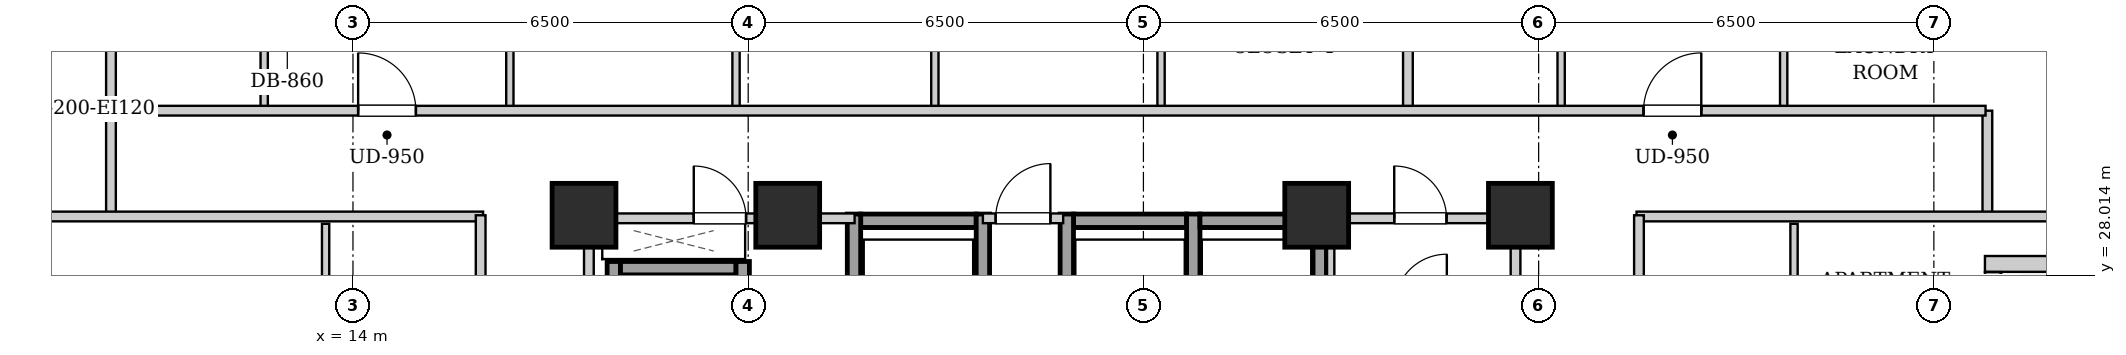
"""IFC4 building model, lengths in metres.
Left out: names, types, materials, properties, quantities, classifications, styles, units other than length and angle.
Written with IfcOpenShell. Run it as: python <this file> out.ifc"""

import sys

from ifc_helpers import new_model, si_unit, direction, frame, frame_2d, origin, origin_2d, place, context, subcontext, project, spatial, rectangle, extrude, element, fill, save


model = new_model("IFC4")
c1 = context("Model", 3, precision=1e-05, world=origin(), true_north=direction((0.0, 1.0)))
c2 = subcontext(c1, "Body", "Model", "MODEL_VIEW")
j1 = project(units=[si_unit("LENGTHUNIT", "METRE"), si_unit("PLANEANGLEUNIT", "RADIAN")], contexts=[c1])
p1 = place(None, origin())
s1 = spatial("IfcSite", under=j1, at=p1, CompositionType="ELEMENT")
p2 = place(p1, origin())
s2 = spatial("IfcBuilding", under=s1, at=p2, CompositionType="ELEMENT")
p3 = place(p2, frame((0.0, 0.0, 81.5)))
s3 = spatial("IfcBuildingStorey", under=s2, at=p3, CompositionType="ELEMENT", Elevation=81.5)
for number, where, z_axis, x_axis in (
    (1, (17.8, 29.0, 0.0), (0.0, 0.0, 1.0), (1.0, 0.0, 0.0)),
    (2, (21.15, 29.0, 0.0), (0.0, 0.0, 1.0), (1.0, 0.0, 0.0)),
    (3, (29.85, 29.0, 0.0), (0.0, 0.0, 1.0), (1.0, 0.0, 0.0)),
    (4, (33.2, 29.0, 0.0), (0.0, 0.0, 1.0), (1.0, 0.0, 0.0)),
):
    element("IfcColumn", number, at=place(p3, frame(where, z_axis=z_axis, x_axis=x_axis)), inside=s3, PredefinedType="COLUMN", context=c2, shape_type="SweptSolid", body=[
        extrude(rectangle(XDim=1.05, YDim=1.05, at=origin_2d()), origin(), (0.0, 0.0, 1.0), 3.2),
    ])
p4 = place(p3, frame((43.24, 28.2, 0.0), z_axis=(0.0, 0.0, 1.0), x_axis=(-1.0, 0.0, 0.0)))
e5 = element("IfcWall", 5, at=p4, inside=s3, PredefinedType="SOLIDWALL", context=c2, shape_type="SweptSolid", body=[
    extrude(rectangle(XDim=2.4, YDim=0.26, at=frame_2d((1.2, 0.0))), origin(), (0.0, 0.0, 1.0), 2.94),
])
p5 = place(p3, frame((40.97, 28.066, 0.0), z_axis=(0.0, 0.0, 1.0), x_axis=(0.0, -1.0, 0.0)))
e6 = element("IfcWall", 6, at=p5, inside=s3, PredefinedType="SOLIDWALL", context=c2, shape_type="SweptSolid", body=[
    extrude(rectangle(XDim=3.332, YDim=0.26, at=frame_2d((1.666, 0.0))), origin(), (0.0, 0.0, 1.0), 2.94),
])
p6 = place(p5, frame((1.116, 0.0, 0.0)))
e7 = element("IfcOpeningElement", 7, at=p6, cuts=e6, PredefinedType="OPENING", context=c2, shape_type="SweptSolid", body=[
    extrude(rectangle(XDim=1.1, YDim=2.0, at=frame_2d((0.55, 1.0))), frame((0.0, 0.14, 0.0), z_axis=(0.0, -1.0, 0.0), x_axis=(1.0, 0.0, 0.0)), (0.0, 0.0, 1.0), 0.28),
])
p7 = place(p5, frame((0.276, 0.0, 0.55)))
e8 = element("IfcOpeningElement", 8, at=p7, cuts=e6, PredefinedType="OPENING", context=c2, shape_type="SweptSolid", body=[
    extrude(rectangle(XDim=0.68, YDim=1.2, at=frame_2d((0.34, 0.6))), frame((0.0, 0.14, 0.0), z_axis=(0.0, -1.0, 0.0), x_axis=(1.0, 0.0, 0.0)), (0.0, 0.0, 1.0), 0.28),
])
p8 = place(p3, frame((22.35, 28.91, 0.0), z_axis=(0.0, 0.0, 1.0), x_axis=(1.0, 0.0, 0.0)))
e9 = element("IfcWall", 9, at=p8, inside=s3, PredefinedType="SHEAR", context=c2, shape_type="SweptSolid", body=[
    extrude(rectangle(XDim=1.9, YDim=0.22, at=frame_2d((0.95, 0.0))), origin(), (0.0, 0.0, 1.0), 2.94),
])
for number, where, z_axis, x_axis in (
    (10, (22.24, 26.58, 0.0), (0.0, 0.0, 1.0), (0.0, 1.0, 0.0)),
    (11, (24.36, 26.58, 0.0), (0.0, 0.0, 1.0), (0.0, 1.0, 0.0)),
):
    element("IfcWall", number, at=place(p3, frame(where, z_axis=z_axis, x_axis=x_axis)), inside=s3, PredefinedType="SHEAR", context=c2, shape_type="SweptSolid", body=[
        extrude(rectangle(XDim=2.44, YDim=0.22, at=frame_2d((1.22, 0.0))), origin(), (0.0, 0.0, 1.0), 2.94),
    ])
p9 = place(p3, frame((25.85, 28.91, 0.0), z_axis=(0.0, 0.0, 1.0), x_axis=(1.0, 0.0, 0.0)))
e12 = element("IfcWall", 12, at=p9, inside=s3, PredefinedType="SHEAR", context=c2, shape_type="SweptSolid", body=[
    extrude(rectangle(XDim=1.86, YDim=0.22, at=frame_2d((0.93, 0.0))), origin(), (0.0, 0.0, 1.0), 2.94),
])
for number, where, z_axis, x_axis in (
    (13, (25.74, 26.58, 0.0), (0.0, 0.0, 1.0), (0.0, 1.0, 0.0)),
    (14, (27.82, 26.58, 0.0), (0.0, 0.0, 1.0), (0.0, 1.0, 0.0)),
):
    element("IfcWall", number, at=place(p3, frame(where, z_axis=z_axis, x_axis=x_axis)), inside=s3, PredefinedType="SHEAR", context=c2, shape_type="SweptSolid", body=[
        extrude(rectangle(XDim=2.44, YDim=0.22, at=frame_2d((1.22, 0.0))), origin(), (0.0, 0.0, 1.0), 2.94),
    ])
p10 = place(p3, frame((27.93, 28.91, 0.0), z_axis=(0.0, 0.0, 1.0), x_axis=(1.0, 0.0, 0.0)))
e15 = element("IfcWall", 15, at=p10, inside=s3, PredefinedType="SHEAR", context=c2, shape_type="SweptSolid", body=[
    extrude(rectangle(XDim=1.86, YDim=0.22, at=frame_2d((0.93, 0.0))), origin(), (0.0, 0.0, 1.0), 2.94),
])
p11 = place(p3, frame((29.9, 26.58, 0.0), z_axis=(0.0, 0.0, 1.0), x_axis=(0.0, 1.0, 0.0)))
e16 = element("IfcWall", 16, at=p11, inside=s3, PredefinedType="SHEAR", context=c2, shape_type="SweptSolid", body=[
    extrude(rectangle(XDim=2.44, YDim=0.22, at=frame_2d((1.22, 0.0))), origin(), (0.0, 0.0, 1.0), 2.94),
])
p12 = place(p3, frame((18.29, 24.1, 0.0), z_axis=(0.0, 0.0, 1.0), x_axis=(0.0, 1.0, 0.0)))
e17 = element("IfcWall", 17, at=p12, inside=s3, PredefinedType="SHEAR", context=c2, shape_type="SweptSolid", body=[
    extrude(rectangle(XDim=4.14, YDim=0.22, at=frame_2d((2.07, 0.0))), origin(), (0.0, 0.0, 1.0), 2.94),
])
p13 = place(p3, frame((18.4, 28.13, 0.0), z_axis=(0.0, 0.0, 1.0), x_axis=(1.0, 0.0, 0.0)))
e18 = element("IfcWall", 18, at=p13, inside=s3, PredefinedType="SHEAR", context=c2, shape_type="SweptSolid", body=[
    extrude(rectangle(XDim=1.9, YDim=0.22, at=frame_2d((0.95, 0.0))), origin(), (0.0, 0.0, 1.0), 2.94),
])
p14 = place(p3, frame((20.41, 26.06, 0.0), z_axis=(0.0, 0.0, 1.0), x_axis=(0.0, 1.0, 0.0)))
e19 = element("IfcWall", 19, at=p14, inside=s3, PredefinedType="SHEAR", context=c2, shape_type="SweptSolid", body=[
    extrude(rectangle(XDim=2.18, YDim=0.22, at=frame_2d((1.09, 0.0))), origin(), (0.0, 0.0, 1.0), 2.94),
])
for number, where, z_axis, x_axis in (
    (20, (17.88, 24.12, 0.0), (0.0, 0.0, 1.0), (0.0, 1.0, 0.0)),
    (21, (33.12, 24.12, 0.0), (0.0, 0.0, 1.0), (0.0, 1.0, 0.0)),
):
    element("IfcWall", number, at=place(p3, frame(where, z_axis=z_axis, x_axis=x_axis)), inside=s3, PredefinedType="PARTITIONING", context=c2, shape_type="SweptSolid", body=[
        extrude(rectangle(XDim=4.76, YDim=0.16, at=frame_2d((2.38, 0.0))), origin(), (0.0, 0.0, 1.0), 2.94),
    ])
p15 = place(p3, frame((24.36, 28.95, 0.0), z_axis=(0.0, 0.0, 1.0), x_axis=(1.0, 0.0, 0.0)))
e22 = element("IfcWall", 22, at=p15, inside=s3, PredefinedType="PARTITIONING", context=c2, shape_type="SweptSolid", body=[
    extrude(rectangle(XDim=1.32, YDim=0.16, at=frame_2d((0.66, 0.0))), origin(), (0.0, 0.0, 1.0), 2.309),
])
p16 = place(p15, frame((0.21, 0.0, 0.0)))
e23 = element("IfcOpeningElement", 23, at=p16, cuts=e22, PredefinedType="OPENING", context=c2, shape_type="SweptSolid", body=[
    extrude(rectangle(XDim=0.9, YDim=2.05, at=frame_2d((0.45, 1.025))), frame((0.0, 0.09, 0.0), z_axis=(0.0, -1.0, 0.0), x_axis=(1.0, 0.0, 0.0)), (0.0, 0.0, 1.0), 0.18),
])
p17 = place(p3, frame((17.96, 28.95, 0.0), z_axis=(0.0, 0.0, 1.0), x_axis=(1.0, 0.0, 0.0)))
e24 = element("IfcWall", 24, at=p17, inside=s3, PredefinedType="PARTITIONING", context=c2, shape_type="SweptSolid", body=[
    extrude(rectangle(XDim=4.29, YDim=0.16, at=frame_2d((2.145, 0.0))), origin(), (0.0, 0.0, 1.0), 2.309),
])
p18 = place(p17, frame((1.645, 0.0, 0.0)))
e25 = element("IfcOpeningElement", 25, at=p18, cuts=e24, PredefinedType="OPENING", context=c2, shape_type="SweptSolid", body=[
    extrude(rectangle(XDim=0.86, YDim=2.05, at=frame_2d((0.43, 1.025))), frame((0.0, 0.09, 0.0), z_axis=(0.0, -1.0, 0.0), x_axis=(1.0, 0.0, 0.0)), (0.0, 0.0, 1.0), 0.18),
])
p19 = place(p3, frame((30.08, 26.18, 0.0), z_axis=(0.0, 0.0, 1.0), x_axis=(0.0, 1.0, 0.0)))
e26 = element("IfcWall", 26, at=p19, inside=s3, PredefinedType="PARTITIONING", context=c2, shape_type="SweptSolid", body=[
    extrude(rectangle(XDim=2.68, YDim=0.12, at=frame_2d((1.34, 0.0))), origin(), (0.0, 0.0, 1.0), 2.94),
])
p20 = place(p3, frame((30.08, 28.95, 0.0), z_axis=(0.0, 0.0, 1.0), x_axis=(1.0, 0.0, 0.0)))
e27 = element("IfcWall", 27, at=p20, inside=s3, PredefinedType="PARTITIONING", context=c2, shape_type="SweptSolid", body=[
    extrude(rectangle(XDim=2.96, YDim=0.16, at=frame_2d((1.48, 0.0))), origin(), (0.0, 0.0, 1.0), 2.94),
])
p21 = place(p20, frame((1.045, 0.0, 0.0)))
e28 = element("IfcOpeningElement", 28, at=p21, cuts=e27, PredefinedType="OPENING", context=c2, shape_type="SweptSolid", body=[
    extrude(rectangle(XDim=0.86, YDim=2.05, at=frame_2d((0.43, 1.025))), frame((0.0, 0.09, 0.0), z_axis=(0.0, -1.0, 0.0), x_axis=(1.0, 0.0, 0.0)), (0.0, 0.0, 1.0), 0.18),
])
for number, where, z_axis, x_axis in (
    (29, (10.02, 28.98, 0.0), (0.0, 0.0, 1.0), (0.0, 1.0, 0.0)),
    (30, (40.88, 28.98, 0.0), (0.0, 0.0, 1.0), (0.0, 1.0, 0.0)),
):
    element("IfcWall", number, at=place(p3, frame(where, z_axis=z_axis, x_axis=x_axis)), inside=s3, PredefinedType="PARTITIONING", context=c2, shape_type="SweptSolid", body=[
        extrude(rectangle(XDim=1.74, YDim=0.16, at=frame_2d((0.87, 0.0))), origin(), (0.0, 0.0, 1.0), 2.94),
    ])
p22 = place(p3, frame((7.78, 28.98, 0.0), z_axis=(0.0, 0.0, 1.0), x_axis=(1.0, 0.0, 0.0)))
e31 = element("IfcWall", 31, at=p22, inside=s3, PredefinedType="PARTITIONING", context=c2, shape_type="SweptSolid", body=[
    extrude(rectangle(XDim=8.36, YDim=0.16, at=frame_2d((4.18, 0.0))), origin(), (0.0, 0.0, 1.0), 2.309),
])
p23 = place(p3, frame((35.11, 28.98, 0.0), z_axis=(0.0, 0.0, 1.0), x_axis=(1.0, 0.0, 0.0)))
e32 = element("IfcWall", 32, at=p23, inside=s3, PredefinedType="PARTITIONING", context=c2, shape_type="SweptSolid", body=[
    extrude(rectangle(XDim=8.01, YDim=0.16, at=frame_2d((4.005, 0.0))), origin(), (0.0, 0.0, 1.0), 2.309),
])
p24 = place(p3, frame((10.02, 30.76, 0.0), z_axis=(0.0, 0.0, 1.0), x_axis=(0.0, 1.0, 0.0)))
e33 = element("IfcWall", 33, at=p24, inside=s3, PredefinedType="PARTITIONING", context=c2, shape_type="SweptSolid", body=[
    extrude(rectangle(XDim=2.91, YDim=0.16, at=frame_2d((1.455, 0.0))), origin(), (0.0, 0.0, 1.0), 2.94),
])
p25 = place(p3, frame((12.54, 30.76, 0.0), z_axis=(0.0, 0.0, 1.0), x_axis=(0.0, 1.0, 0.0)))
e34 = element("IfcWall", 34, at=p25, inside=s3, PredefinedType="PARTITIONING", context=c2, shape_type="SweptSolid", body=[
    extrude(rectangle(XDim=2.85, YDim=0.12, at=frame_2d((1.425, 0.0))), origin(), (0.0, 0.0, 1.0), 2.94),
])
p26 = place(p25, frame((0.995, 0.0, 0.0)))
e35 = element("IfcOpeningElement", 35, at=p26, cuts=e34, PredefinedType="OPENING", context=c2, shape_type="SweptSolid", body=[
    extrude(rectangle(XDim=0.86, YDim=2.05, at=frame_2d((0.43, 1.025))), frame((0.0, 0.07, 0.0), z_axis=(0.0, -1.0, 0.0), x_axis=(1.0, 0.0, 0.0)), (0.0, 0.0, 1.0), 0.14),
])
p27 = place(p3, frame((16.58, 30.76, 0.0), z_axis=(0.0, 0.0, 1.0), x_axis=(0.0, 1.0, 0.0)))
e36 = element("IfcWall", 36, at=p27, inside=s3, PredefinedType="PARTITIONING", context=c2, shape_type="SweptSolid", body=[
    extrude(rectangle(XDim=2.85, YDim=0.12, at=frame_2d((1.425, 0.0))), origin(), (0.0, 0.0, 1.0), 2.94),
])
p28 = place(p27, frame((0.975, 0.0, 0.0)))
e37 = element("IfcOpeningElement", 37, at=p28, cuts=e36, PredefinedType="OPENING", context=c2, shape_type="SweptSolid", body=[
    extrude(rectangle(XDim=0.9, YDim=2.05, at=frame_2d((0.45, 1.025))), frame((0.0, 0.07, 0.0), z_axis=(0.0, -1.0, 0.0), x_axis=(1.0, 0.0, 0.0)), (0.0, 0.0, 1.0), 0.14),
])
p29 = place(p3, frame((20.3, 30.76, 0.0), z_axis=(0.0, 0.0, 1.0), x_axis=(0.0, 1.0, 0.0)))
e38 = element("IfcWall", 38, at=p29, inside=s3, PredefinedType="PARTITIONING", context=c2, shape_type="SweptSolid", body=[
    extrude(rectangle(XDim=2.85, YDim=0.12, at=frame_2d((1.425, 0.0))), origin(), (0.0, 0.0, 1.0), 2.94),
])
p30 = place(p29, frame((0.975, 0.0, 0.0)))
e39 = element("IfcOpeningElement", 39, at=p30, cuts=e38, PredefinedType="OPENING", context=c2, shape_type="SweptSolid", body=[
    extrude(rectangle(XDim=0.9, YDim=2.05, at=frame_2d((0.45, 1.025))), frame((0.0, 0.07, 0.0), z_axis=(0.0, -1.0, 0.0), x_axis=(1.0, 0.0, 0.0)), (0.0, 0.0, 1.0), 0.14),
])
p31 = place(p3, frame((23.57, 30.76, 0.0), z_axis=(0.0, 0.0, 1.0), x_axis=(0.0, 1.0, 0.0)))
e40 = element("IfcWall", 40, at=p31, inside=s3, PredefinedType="PARTITIONING", context=c2, shape_type="SweptSolid", body=[
    extrude(rectangle(XDim=2.85, YDim=0.12, at=frame_2d((1.425, 0.0))), origin(), (0.0, 0.0, 1.0), 2.94),
])
p32 = place(p31, frame((0.975, 0.0, 0.0)))
e41 = element("IfcOpeningElement", 41, at=p32, cuts=e40, PredefinedType="OPENING", context=c2, shape_type="SweptSolid", body=[
    extrude(rectangle(XDim=0.9, YDim=2.05, at=frame_2d((0.45, 1.025))), frame((0.0, 0.07, 0.0), z_axis=(0.0, -1.0, 0.0), x_axis=(1.0, 0.0, 0.0)), (0.0, 0.0, 1.0), 0.14),
])
p33 = place(p3, frame((27.29, 30.76, 0.0), z_axis=(0.0, 0.0, 1.0), x_axis=(0.0, 1.0, 0.0)))
e42 = element("IfcWall", 42, at=p33, inside=s3, PredefinedType="PARTITIONING", context=c2, shape_type="SweptSolid", body=[
    extrude(rectangle(XDim=2.85, YDim=0.12, at=frame_2d((1.425, 0.0))), origin(), (0.0, 0.0, 1.0), 2.94),
])
p34 = place(p33, frame((0.975, 0.0, 0.0)))
e43 = element("IfcOpeningElement", 43, at=p34, cuts=e42, PredefinedType="OPENING", context=c2, shape_type="SweptSolid", body=[
    extrude(rectangle(XDim=0.9, YDim=2.05, at=frame_2d((0.45, 1.025))), frame((0.0, 0.07, 0.0), z_axis=(0.0, -1.0, 0.0), x_axis=(1.0, 0.0, 0.0)), (0.0, 0.0, 1.0), 0.14),
])
p35 = place(p3, frame((31.35, 30.76, 0.0), z_axis=(0.0, 0.0, 1.0), x_axis=(0.0, 1.0, 0.0)))
e44 = element("IfcWall", 44, at=p35, inside=s3, PredefinedType="PARTITIONING", context=c2, shape_type="SweptSolid", body=[
    extrude(rectangle(XDim=12.26, YDim=0.16, at=frame_2d((6.13, 0.0))), origin(), (0.0, 0.0, 1.0), 2.94),
])
p36 = place(p3, frame((33.87, 30.76, 0.0), z_axis=(0.0, 0.0, 1.0), x_axis=(0.0, 1.0, 0.0)))
e45 = element("IfcWall", 45, at=p36, inside=s3, PredefinedType="PARTITIONING", context=c2, shape_type="SweptSolid", body=[
    extrude(rectangle(XDim=2.85, YDim=0.12, at=frame_2d((1.425, 0.0))), origin(), (0.0, 0.0, 1.0), 2.94),
])
p37 = place(p36, frame((0.995, 0.0, 0.0)))
e46 = element("IfcOpeningElement", 46, at=p37, cuts=e45, PredefinedType="OPENING", context=c2, shape_type="SweptSolid", body=[
    extrude(rectangle(XDim=0.86, YDim=2.05, at=frame_2d((0.43, 1.025))), frame((0.0, 0.07, 0.0), z_axis=(0.0, -1.0, 0.0), x_axis=(1.0, 0.0, 0.0)), (0.0, 0.0, 1.0), 0.14),
])
p38 = place(p3, frame((37.53, 30.76, 0.0), z_axis=(0.0, 0.0, 1.0), x_axis=(0.0, 1.0, 0.0)))
e47 = element("IfcWall", 47, at=p38, inside=s3, PredefinedType="PARTITIONING", context=c2, shape_type="SweptSolid", body=[
    extrude(rectangle(XDim=2.85, YDim=0.12, at=frame_2d((1.425, 0.0))), origin(), (0.0, 0.0, 1.0), 2.94),
])
p39 = place(p38, frame((0.975, 0.0, 0.0)))
e48 = element("IfcOpeningElement", 48, at=p39, cuts=e47, PredefinedType="OPENING", context=c2, shape_type="SweptSolid", body=[
    extrude(rectangle(XDim=0.9, YDim=2.05, at=frame_2d((0.45, 1.025))), frame((0.0, 0.07, 0.0), z_axis=(0.0, -1.0, 0.0), x_axis=(1.0, 0.0, 0.0)), (0.0, 0.0, 1.0), 0.14),
])
p40 = place(p3, frame((13.55, 24.552, 0.0), z_axis=(0.0, 0.0, 1.0), x_axis=(0.0, 1.0, 0.0)))
e49 = element("IfcWall", 49, at=p40, inside=s3, PredefinedType="PARTITIONING", context=c2, shape_type="SweptSolid", body=[
    extrude(rectangle(XDim=4.308, YDim=0.12, at=frame_2d((2.154, 0.0))), origin(), (0.0, 0.0, 1.0), 2.94),
])
p41 = place(p40, frame((1.704, 0.0, 0.0)))
e50 = element("IfcOpeningElement", 50, at=p41, cuts=e49, PredefinedType="OPENING", context=c2, shape_type="SweptSolid", body=[
    extrude(rectangle(XDim=0.9, YDim=2.05, at=frame_2d((0.45, 1.025))), frame((0.0, 0.07, 0.0), z_axis=(0.0, -1.0, 0.0), x_axis=(1.0, 0.0, 0.0)), (0.0, 0.0, 1.0), 0.14),
])
p42 = place(p3, frame((37.7, 24.552, 0.0), z_axis=(0.0, 0.0, 1.0), x_axis=(0.0, 1.0, 0.0)))
e51 = element("IfcWall", 51, at=p42, inside=s3, PredefinedType="PARTITIONING", context=c2, shape_type="SweptSolid", body=[
    extrude(rectangle(XDim=4.308, YDim=0.12, at=frame_2d((2.154, 0.0))), origin(), (0.0, 0.0, 1.0), 2.94),
])
p43 = place(p42, frame((1.704, 0.0, 0.0)))
e52 = element("IfcOpeningElement", 52, at=p43, cuts=e51, PredefinedType="OPENING", context=c2, shape_type="SweptSolid", body=[
    extrude(rectangle(XDim=0.9, YDim=2.05, at=frame_2d((0.45, 1.025))), frame((0.0, 0.07, 0.0), z_axis=(0.0, -1.0, 0.0), x_axis=(1.0, 0.0, 0.0)), (0.0, 0.0, 1.0), 0.14),
])
p44 = place(p3, frame((10.05, 30.72, 0.0), z_axis=(0.0, 0.0, 1.0), x_axis=(1.0, 0.0, 0.0)))
e53 = element("IfcWall", 53, at=p44, inside=s3, PredefinedType="PARTITIONING", context=c2, shape_type="SweptSolid", body=[
    extrude(rectangle(XDim=30.8, YDim=0.16, at=frame_2d((15.4, 0.0))), origin(), (0.0, 0.0, 1.0), 2.94),
])
p45 = place(p44, frame((4.035, 0.0, 0.0)))
e54 = element("IfcOpeningElement", 54, at=p45, cuts=e53, PredefinedType="OPENING", context=c2, shape_type="SweptSolid", body=[
    extrude(rectangle(XDim=0.95, YDim=2.1, at=frame_2d((0.475, 1.05))), frame((0.0, 0.09, 0.0), z_axis=(0.0, -1.0, 0.0), x_axis=(1.0, 0.0, 0.0)), (0.0, 0.0, 1.0), 0.18),
])
p46 = place(p44, frame((25.175, 0.0, 0.0)))
e55 = element("IfcOpeningElement", 55, at=p46, cuts=e53, PredefinedType="OPENING", context=c2, shape_type="SweptSolid", body=[
    extrude(rectangle(XDim=0.95, YDim=2.1, at=frame_2d((0.475, 1.05))), frame((0.0, 0.09, 0.0), z_axis=(0.0, -1.0, 0.0), x_axis=(1.0, 0.0, 0.0)), (0.0, 0.0, 1.0), 0.18),
])
p47 = place(p3, frame((16.1, 15.07, 0.0), z_axis=(0.0, 0.0, 1.0), x_axis=(0.0, 1.0, 0.0)))
e56 = element("IfcWall", 56, at=p47, inside=s3, PredefinedType="PARTITIONING", context=c2, shape_type="SweptSolid", body=[
    extrude(rectangle(XDim=13.93, YDim=0.16, at=frame_2d((6.965, 0.0))), origin(), (0.0, 0.0, 1.0), 2.94),
])
p48 = place(p47, frame((4.385, 0.0, 0.0)))
e57 = element("IfcOpeningElement", 57, at=p48, cuts=e56, PredefinedType="OPENING", context=c2, shape_type="SweptSolid", body=[
    extrude(rectangle(XDim=0.95, YDim=2.1, at=frame_2d((0.475, 1.05))), frame((0.0, 0.09, 0.0), z_axis=(0.0, -1.0, 0.0), x_axis=(1.0, 0.0, 0.0)), (0.0, 0.0, 1.0), 0.18),
])
p49 = place(p3, frame((35.15, 15.07, 0.0), z_axis=(0.0, 0.0, 1.0), x_axis=(0.0, 1.0, 0.0)))
e58 = element("IfcWall", 58, at=p49, inside=s3, PredefinedType="PARTITIONING", context=c2, shape_type="SweptSolid", body=[
    extrude(rectangle(XDim=13.93, YDim=0.16, at=frame_2d((6.965, 0.0))), origin(), (0.0, 0.0, 1.0), 2.94),
])
p50 = place(p49, frame((4.385, 0.0, 0.0)))
e59 = element("IfcOpeningElement", 59, at=p50, cuts=e58, PredefinedType="OPENING", context=c2, shape_type="SweptSolid", body=[
    extrude(rectangle(XDim=0.95, YDim=2.1, at=frame_2d((0.475, 1.05))), frame((0.0, 0.09, 0.0), z_axis=(0.0, -1.0, 0.0), x_axis=(1.0, 0.0, 0.0)), (0.0, 0.0, 1.0), 0.18),
])
p51 = place(p16, origin())
e60 = element("IfcDoor", 60, at=p51, inside=s3, OperationType="SINGLE_SWING_RIGHT", PredefinedType="DOOR", context=c2, shape_type="SweptSolid", body=[
    extrude(rectangle(XDim=0.9, YDim=2.05, at=frame_2d((0.45, 1.025))), frame((0.0, 0.025, 0.0), z_axis=(0.0, -1.0, 0.0), x_axis=(1.0, 0.0, 0.0)), (0.0, 0.0, 1.0), 0.05),
])
fill(e23, e60)
p52 = place(p18, origin())
e61 = element("IfcDoor", 61, at=p52, inside=s3, OperationType="SINGLE_SWING_LEFT", PredefinedType="DOOR", context=c2, shape_type="SweptSolid", body=[
    extrude(rectangle(XDim=0.86, YDim=2.05, at=frame_2d((0.43, 1.025))), frame((0.0, 0.025, 0.0), z_axis=(0.0, -1.0, 0.0), x_axis=(1.0, 0.0, 0.0)), (0.0, 0.0, 1.0), 0.05),
])
fill(e25, e61)
p53 = place(p21, origin())
e62 = element("IfcDoor", 62, at=p53, inside=s3, OperationType="SINGLE_SWING_LEFT", PredefinedType="DOOR", context=c2, shape_type="SweptSolid", body=[
    extrude(rectangle(XDim=0.86, YDim=2.05, at=frame_2d((0.43, 1.025))), frame((0.0, 0.025, 0.0), z_axis=(0.0, -1.0, 0.0), x_axis=(1.0, 0.0, 0.0)), (0.0, 0.0, 1.0), 0.05),
])
fill(e28, e62)
p54 = place(p45, origin())
e63 = element("IfcDoor", 63, at=p54, inside=s3, OperationType="SINGLE_SWING_LEFT", PredefinedType="DOOR", context=c2, shape_type="SweptSolid", body=[
    extrude(rectangle(XDim=0.95, YDim=2.1, at=frame_2d((0.475, 1.05))), frame((0.0, 0.025, 0.0), z_axis=(0.0, -1.0, 0.0), x_axis=(1.0, 0.0, 0.0)), (0.0, 0.0, 1.0), 0.05),
])
fill(e54, e63)
p55 = place(p46, origin())
e64 = element("IfcDoor", 64, at=p55, inside=s3, OperationType="SINGLE_SWING_RIGHT", PredefinedType="DOOR", context=c2, shape_type="SweptSolid", body=[
    extrude(rectangle(XDim=0.95, YDim=2.1, at=frame_2d((0.475, 1.05))), frame((0.0, 0.025, 0.0), z_axis=(0.0, -1.0, 0.0), x_axis=(1.0, 0.0, 0.0)), (0.0, 0.0, 1.0), 0.05),
])
fill(e55, e64)
save(model, sys.argv[1])
